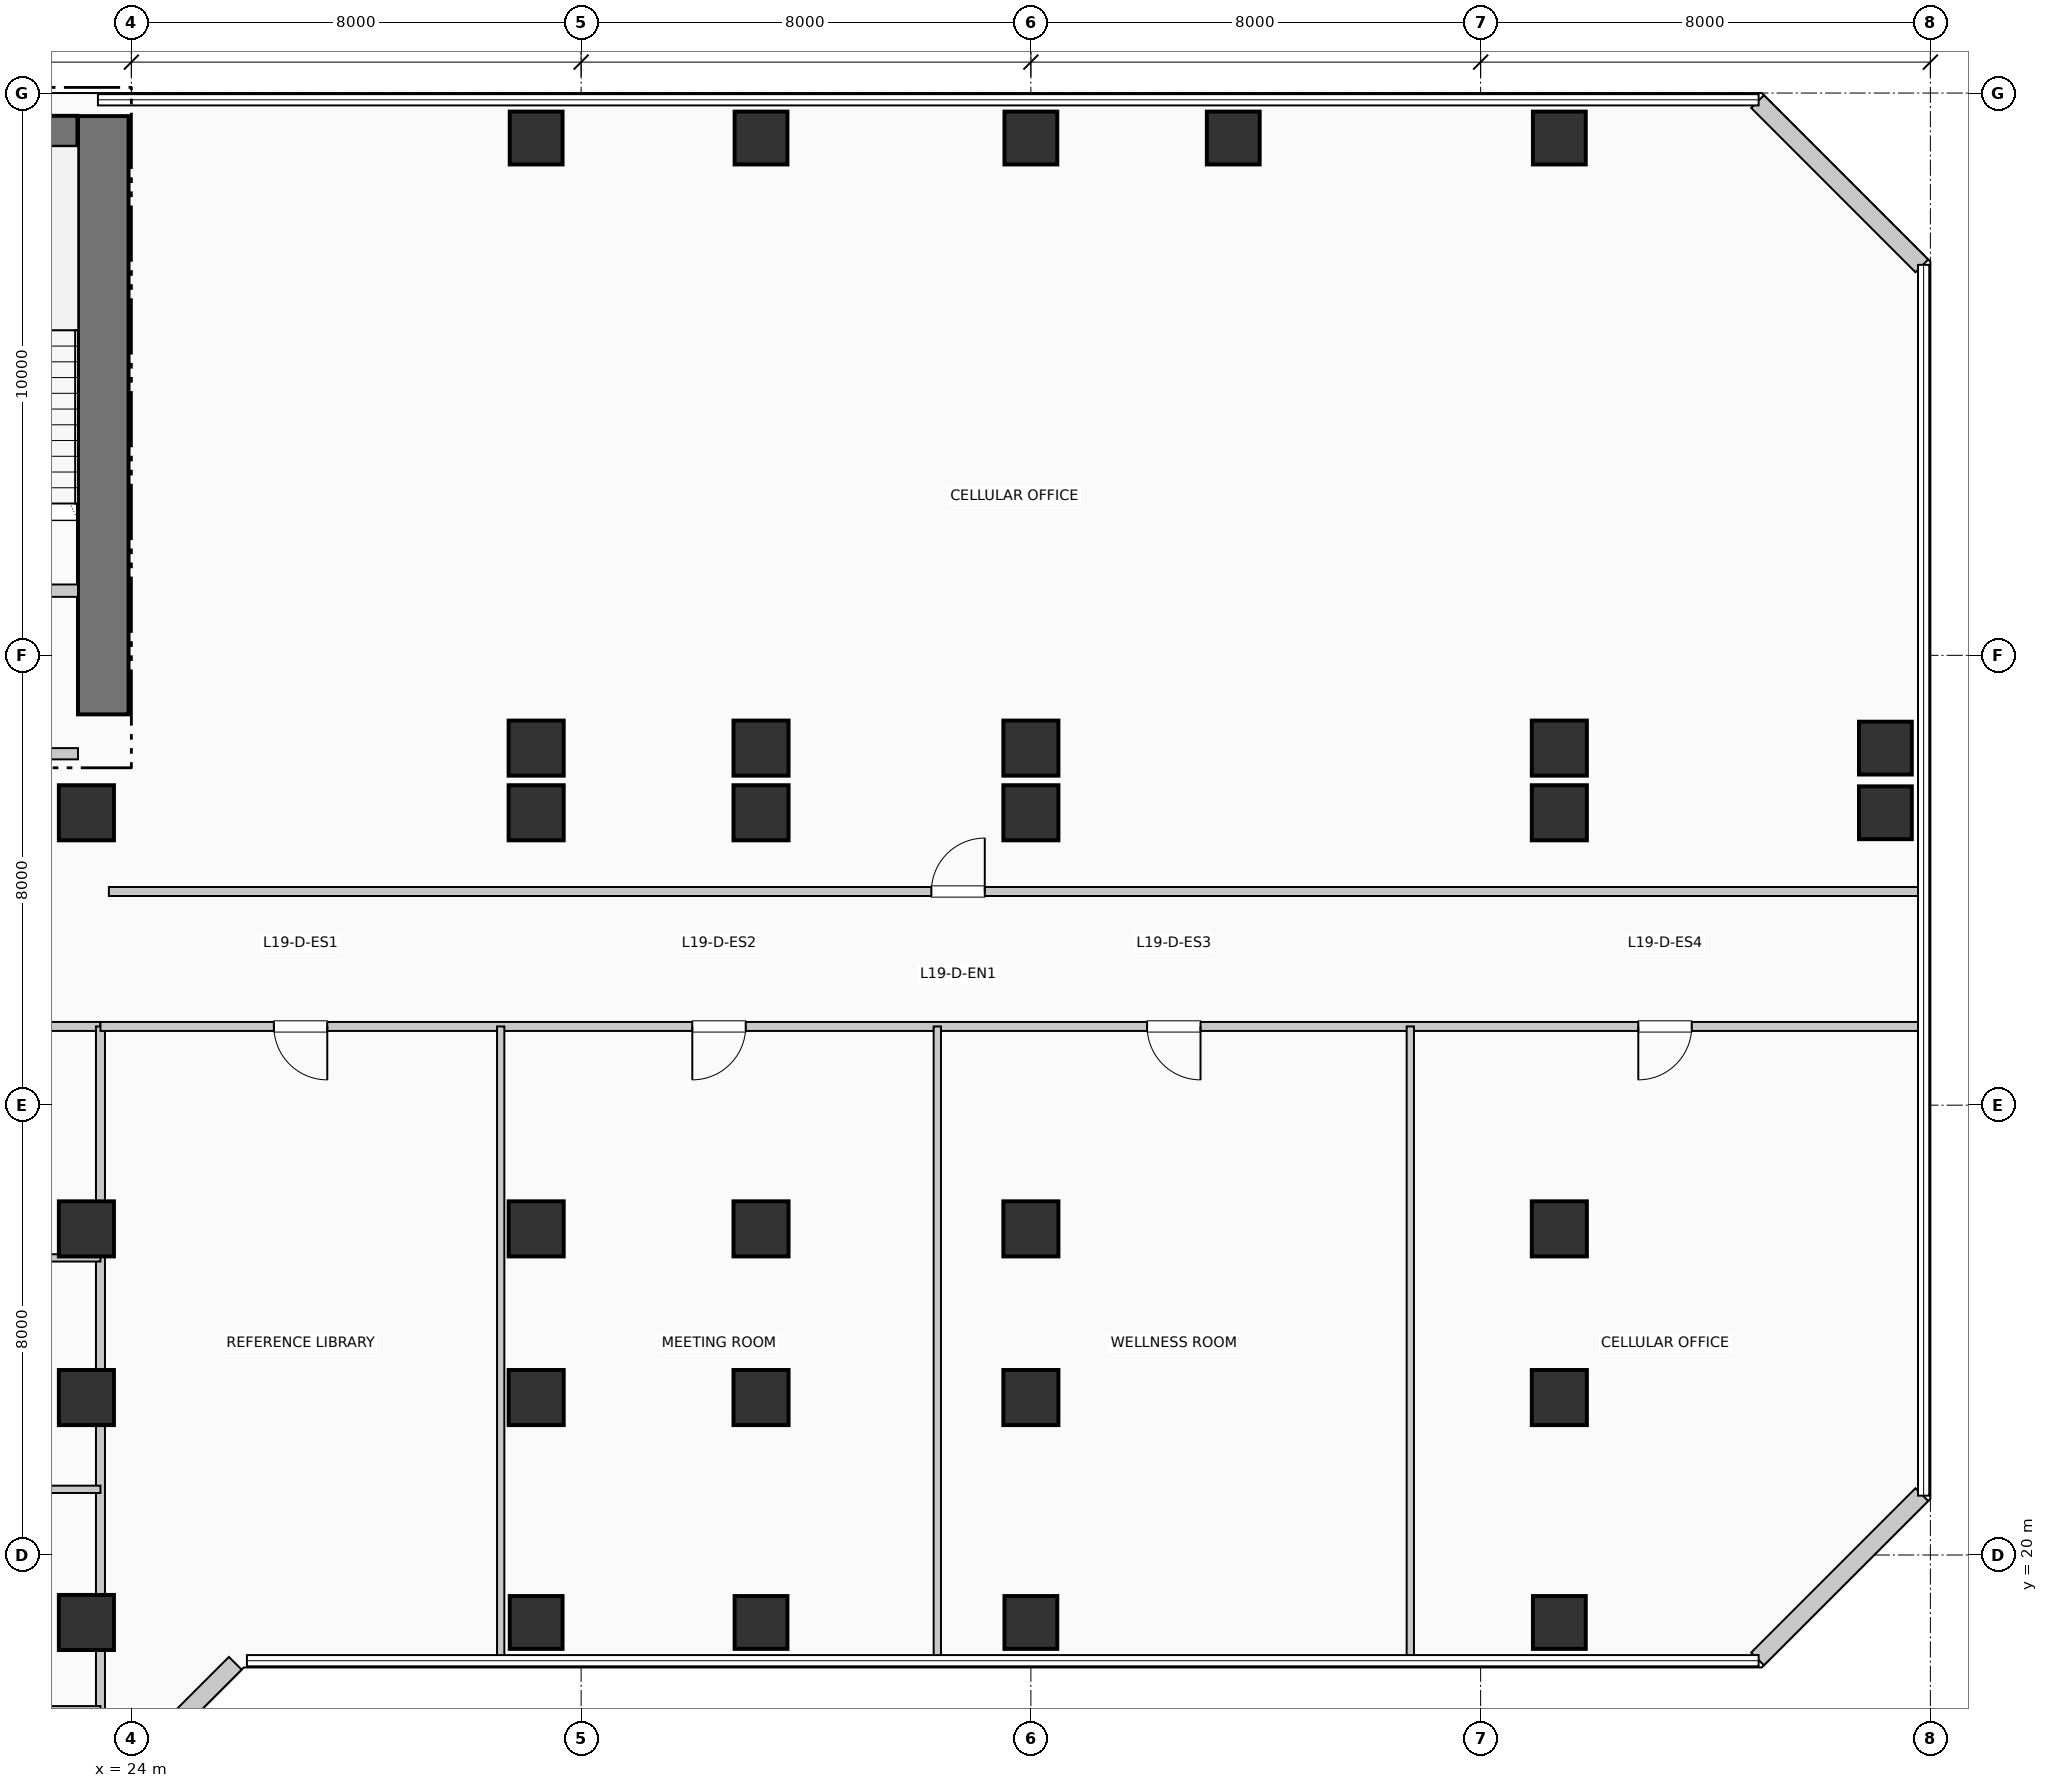
"""IFC4 building model, lengths in metres.
Left out: names, types, materials, properties, quantities, classifications, styles, units other than length and angle.
Written with IfcOpenShell. Run it as: python <this file> out.ifc"""

import sys

from ifc_helpers import new_model, si_unit, direction, frame, frame_2d, origin, origin_2d, place, context, subcontext, project, spatial, rectangle, extrude, element, fill, save


model = new_model("IFC4")
c1 = context("Model", 3, precision=1e-05, world=origin(), true_north=direction((0.0, 1.0)))
c2 = subcontext(c1, "Body", "Model", "MODEL_VIEW")
j1 = project(units=[si_unit("LENGTHUNIT", "METRE"), si_unit("PLANEANGLEUNIT", "RADIAN")], contexts=[c1])
p1 = place(None, origin())
s1 = spatial("IfcSite", under=j1, at=p1, CompositionType="ELEMENT")
p2 = place(p1, origin())
s2 = spatial("IfcBuilding", under=s1, at=p2, CompositionType="ELEMENT")
p3 = place(p2, frame((0.0, 0.0, 81.84)))
s3 = spatial("IfcBuildingStorey", under=s2, at=p3, CompositionType="ELEMENT", Elevation=81.84)
p4 = place(p3, frame((23.5, 34.95, 0.0), z_axis=(0.0, 0.0, 1.0), x_axis=(0.0, 1.0, 0.0)))
e1 = element("IfcWall", 1, at=p4, inside=s3, PredefinedType="SHEAR", context=c2, shape_type="SweptSolid", body=[
    extrude(rectangle(XDim=10.64, YDim=0.9, at=frame_2d((5.32, 0.0))), origin(), (0.0, 0.0, 1.0), 3.96),
])
p5 = place(p3, frame((19.35, 45.32, 0.0), z_axis=(0.0, 0.0, 1.0), x_axis=(1.0, 0.0, 0.0)))
e2 = element("IfcWall", 2, at=p5, inside=s3, PredefinedType="SHEAR", context=c2, shape_type="SweptSolid", body=[
    extrude(rectangle(XDim=3.69, YDim=0.55, at=frame_2d((1.845, 0.0))), origin(), (0.0, 0.0, 1.0), 3.96),
])
p6 = place(p5, frame((1.15, 0.0, 1.05)))
e3 = element("IfcOpeningElement", 3, at=p6, cuts=e2, PredefinedType="OPENING", context=c2, shape_type="SweptSolid", body=[
    extrude(rectangle(XDim=1.4, YDim=1.8, at=frame_2d((0.7, 0.9))), frame((0.0, 0.285, 0.0), z_axis=(0.0, -1.0, 0.0), x_axis=(1.0, 0.0, 0.0)), (0.0, 0.0, 1.0), 0.57),
])
for number, where, z_axis, x_axis in (
    (4, (23.2, 18.8, 0.0), (0.0, 0.0, 1.0), (1.0, 0.0, 0.0)),
    (5, (23.2, 22.8, 0.0), (0.0, 0.0, 1.0), (1.0, 0.0, 0.0)),
    (6, (23.2, 25.8, 0.0), (0.0, 0.0, 1.0), (1.0, 0.0, 0.0)),
    (7, (23.2, 33.2, 0.0), (0.0, 0.0, 1.0), (1.0, 0.0, 0.0)),
):
    element("IfcColumn", number, at=place(p3, frame(where, z_axis=z_axis, x_axis=x_axis)), inside=s3, PredefinedType="COLUMN", context=c2, shape_type="SweptSolid", body=[
        extrude(rectangle(XDim=0.98, YDim=0.98, at=origin_2d()), origin(), (0.0, 0.0, 1.0), 3.96),
    ])
p7 = place(p3, frame((31.2, 18.8, 0.0), z_axis=(0.0, 0.0, 1.0), x_axis=(1.0, 0.0, 0.0)))
e8 = element("IfcColumn", 8, at=p7, inside=s3, PredefinedType="COLUMN", context=c2, shape_type="SweptSolid", body=[
    extrude(rectangle(XDim=0.94, YDim=0.94, at=origin_2d()), origin(), (0.0, 0.0, 1.0), 3.96),
])
for number, where, z_axis, x_axis in (
    (9, (31.2, 22.8, 0.0), (0.0, 0.0, 1.0), (1.0, 0.0, 0.0)),
    (10, (31.2, 25.8, 0.0), (0.0, 0.0, 1.0), (1.0, 0.0, 0.0)),
    (11, (31.2, 33.2, 0.0), (0.0, 0.0, 1.0), (1.0, 0.0, 0.0)),
    (12, (31.2, 34.35, 0.0), (0.0, 0.0, 1.0), (1.0, 0.0, 0.0)),
):
    element("IfcColumn", number, at=place(p3, frame(where, z_axis=z_axis, x_axis=x_axis)), inside=s3, PredefinedType="COLUMN", context=c2, shape_type="SweptSolid", body=[
        extrude(rectangle(XDim=0.98, YDim=0.98, at=origin_2d()), origin(), (0.0, 0.0, 1.0), 3.96),
    ])
for number, where, z_axis, x_axis in (
    (13, (31.2, 45.2, 0.0), (0.0, 0.0, 1.0), (1.0, 0.0, 0.0)),
    (14, (35.2, 18.8, 0.0), (0.0, 0.0, 1.0), (1.0, 0.0, 0.0)),
):
    element("IfcColumn", number, at=place(p3, frame(where, z_axis=z_axis, x_axis=x_axis)), inside=s3, PredefinedType="COLUMN", context=c2, shape_type="SweptSolid", body=[
        extrude(rectangle(XDim=0.94, YDim=0.94, at=origin_2d()), origin(), (0.0, 0.0, 1.0), 3.96),
    ])
for number, where, z_axis, x_axis in (
    (15, (35.2, 22.8, 0.0), (0.0, 0.0, 1.0), (1.0, 0.0, 0.0)),
    (16, (35.2, 25.8, 0.0), (0.0, 0.0, 1.0), (1.0, 0.0, 0.0)),
    (17, (35.2, 33.2, 0.0), (0.0, 0.0, 1.0), (1.0, 0.0, 0.0)),
    (18, (35.2, 34.35, 0.0), (0.0, 0.0, 1.0), (1.0, 0.0, 0.0)),
):
    element("IfcColumn", number, at=place(p3, frame(where, z_axis=z_axis, x_axis=x_axis)), inside=s3, PredefinedType="COLUMN", context=c2, shape_type="SweptSolid", body=[
        extrude(rectangle(XDim=0.98, YDim=0.98, at=origin_2d()), origin(), (0.0, 0.0, 1.0), 3.96),
    ])
for number, where, z_axis, x_axis in (
    (19, (35.2, 45.2, 0.0), (0.0, 0.0, 1.0), (1.0, 0.0, 0.0)),
    (20, (40.0, 18.8, 0.0), (0.0, 0.0, 1.0), (1.0, 0.0, 0.0)),
):
    element("IfcColumn", number, at=place(p3, frame(where, z_axis=z_axis, x_axis=x_axis)), inside=s3, PredefinedType="COLUMN", context=c2, shape_type="SweptSolid", body=[
        extrude(rectangle(XDim=0.94, YDim=0.94, at=origin_2d()), origin(), (0.0, 0.0, 1.0), 3.96),
    ])
for number, where, z_axis, x_axis in (
    (21, (40.0, 22.8, 0.0), (0.0, 0.0, 1.0), (1.0, 0.0, 0.0)),
    (22, (40.0, 25.8, 0.0), (0.0, 0.0, 1.0), (1.0, 0.0, 0.0)),
    (23, (40.0, 33.2, 0.0), (0.0, 0.0, 1.0), (1.0, 0.0, 0.0)),
    (24, (40.0, 34.35, 0.0), (0.0, 0.0, 1.0), (1.0, 0.0, 0.0)),
):
    element("IfcColumn", number, at=place(p3, frame(where, z_axis=z_axis, x_axis=x_axis)), inside=s3, PredefinedType="COLUMN", context=c2, shape_type="SweptSolid", body=[
        extrude(rectangle(XDim=0.98, YDim=0.98, at=origin_2d()), origin(), (0.0, 0.0, 1.0), 3.96),
    ])
for number, where, z_axis, x_axis in (
    (25, (40.0, 45.2, 0.0), (0.0, 0.0, 1.0), (1.0, 0.0, 0.0)),
    (26, (43.6, 45.2, 0.0), (0.0, 0.0, 1.0), (1.0, 0.0, 0.0)),
    (27, (49.4, 18.8, 0.0), (0.0, 0.0, 1.0), (1.0, 0.0, 0.0)),
):
    element("IfcColumn", number, at=place(p3, frame(where, z_axis=z_axis, x_axis=x_axis)), inside=s3, PredefinedType="COLUMN", context=c2, shape_type="SweptSolid", body=[
        extrude(rectangle(XDim=0.94, YDim=0.94, at=origin_2d()), origin(), (0.0, 0.0, 1.0), 3.96),
    ])
for number, where, z_axis, x_axis in (
    (28, (49.4, 22.8, 0.0), (0.0, 0.0, 1.0), (1.0, 0.0, 0.0)),
    (29, (49.4, 25.8, 0.0), (0.0, 0.0, 1.0), (1.0, 0.0, 0.0)),
    (30, (49.4, 33.2, 0.0), (0.0, 0.0, 1.0), (1.0, 0.0, 0.0)),
    (31, (49.4, 34.35, 0.0), (0.0, 0.0, 1.0), (1.0, 0.0, 0.0)),
):
    element("IfcColumn", number, at=place(p3, frame(where, z_axis=z_axis, x_axis=x_axis)), inside=s3, PredefinedType="COLUMN", context=c2, shape_type="SweptSolid", body=[
        extrude(rectangle(XDim=0.98, YDim=0.98, at=origin_2d()), origin(), (0.0, 0.0, 1.0), 3.96),
    ])
for number, where, z_axis, x_axis in (
    (32, (49.4, 45.2, 0.0), (0.0, 0.0, 1.0), (1.0, 0.0, 0.0)),
    (33, (55.2, 33.2, 0.0), (0.0, 0.0, 1.0), (1.0, 0.0, 0.0)),
    (34, (55.2, 34.35, 0.0), (0.0, 0.0, 1.0), (1.0, 0.0, 0.0)),
):
    element("IfcColumn", number, at=place(p3, frame(where, z_axis=z_axis, x_axis=x_axis)), inside=s3, PredefinedType="COLUMN", context=c2, shape_type="SweptSolid", body=[
        extrude(rectangle(XDim=0.94, YDim=0.94, at=origin_2d()), origin(), (0.0, 0.0, 1.0), 3.96),
    ])
p8 = place(p3, frame((23.926, 16.152, 0.0), z_axis=(0.0, 0.0, 1.0), x_axis=(0.707106781187, 0.707106781187, 0.0)))
e35 = element("IfcWall", 35, at=p8, inside=s3, PredefinedType="SOLIDWALL", context=c2, shape_type="SweptSolid", body=[
    extrude(rectangle(XDim=2.718, YDim=0.32, at=frame_2d((1.359, 0.0))), origin(), (0.0, 0.0, 1.0), 3.71),
])
for number, where, z_axis, x_axis in (
    (36, (52.926, 18.152, 0.0), (0.0, 0.0, 1.0), (0.707, 0.707, 0.0)),
    (37, (55.848, 42.926, 0.0), (0.0, 0.0, 1.0), (-0.707, 0.707, 0.0)),
):
    element("IfcWall", number, at=place(p3, frame(where, z_axis=z_axis, x_axis=x_axis)), inside=s3, PredefinedType="SOLIDWALL", context=c2, shape_type="SweptSolid", body=[
        extrude(rectangle(XDim=4.133, YDim=0.32, at=frame_2d((2.066, 0.0))), origin(), (0.0, 0.0, 1.0), 3.71),
    ])
p9 = place(p3, frame((19.9, 37.15, 0.0), z_axis=(0.0, 0.0, 1.0), x_axis=(1.0, 0.0, 0.0)))
e38 = element("IfcWall", 38, at=p9, inside=s3, PredefinedType="PARTITIONING", context=c2, shape_type="SweptSolid", body=[
    extrude(rectangle(XDim=3.15, YDim=0.22, at=frame_2d((1.575, 0.0))), origin(), (0.0, 0.0, 1.0), 3.71),
])
p10 = place(p9, frame((2.05, 0.0, 0.0), z_axis=(0.0, 0.0, 1.0), x_axis=(-1.0, 0.0, 0.0)))
e39 = element("IfcOpeningElement", 39, at=p10, cuts=e38, PredefinedType="OPENING", context=c2, shape_type="SweptSolid", body=[
    extrude(rectangle(XDim=1.05, YDim=2.15, at=frame_2d((0.525, 1.075))), frame((0.0, 0.12, 0.0), z_axis=(0.0, -1.0, 0.0), x_axis=(1.0, 0.0, 0.0)), (0.0, 0.0, 1.0), 0.24),
])
p11 = place(p3, frame((19.8, 34.25, 0.0), z_axis=(0.0, 0.0, 1.0), x_axis=(1.0, 0.0, 0.0)))
e40 = element("IfcWall", 40, at=p11, inside=s3, PredefinedType="PARTITIONING", context=c2, shape_type="SweptSolid", body=[
    extrude(rectangle(XDim=3.25, YDim=0.2, at=frame_2d((1.625, 0.0))), origin(), (0.0, 0.0, 1.0), 3.71),
])
p12 = place(p11, frame((2.15, 0.0, 0.0), z_axis=(0.0, 0.0, 1.0), x_axis=(-1.0, 0.0, 0.0)))
e41 = element("IfcOpeningElement", 41, at=p12, cuts=e40, PredefinedType="OPENING", context=c2, shape_type="SweptSolid", body=[
    extrude(rectangle(XDim=1.1, YDim=2.15, at=frame_2d((0.55, 1.075))), frame((0.0, 0.11, 0.0), z_axis=(0.0, -1.0, 0.0), x_axis=(1.0, 0.0, 0.0)), (0.0, 0.0, 1.0), 0.22),
])
p13 = place(p3, frame((6.4, 29.4, 0.0), z_axis=(0.0, 0.0, 1.0), x_axis=(1.0, 0.0, 0.0)))
e42 = element("IfcWall", 42, at=p13, inside=s3, PredefinedType="PARTITIONING", context=c2, shape_type="SweptSolid", body=[
    extrude(rectangle(XDim=17.05, YDim=0.16, at=frame_2d((8.525, 0.0))), origin(), (0.0, 0.0, 1.0), 3.365),
])
p14 = place(p3, frame((23.45, 0.19, 0.0), z_axis=(0.0, 0.0, 1.0), x_axis=(0.0, 1.0, 0.0)))
e43 = element("IfcWall", 43, at=p14, inside=s3, PredefinedType="PARTITIONING", context=c2, shape_type="SweptSolid", body=[
    extrude(rectangle(XDim=29.21, YDim=0.16, at=frame_2d((14.605, 0.0))), origin(), (0.0, 0.0, 1.0), 2.995),
])
for number, where, z_axis, x_axis in (
    (44, (6.4, 17.248, 0.0), (0.0, 0.0, 1.0), (1.0, 0.0, 0.0)),
    (45, (6.4, 21.168, 0.0), (0.0, 0.0, 1.0), (1.0, 0.0, 0.0)),
    (46, (6.4, 25.284, 0.0), (0.0, 0.0, 1.0), (1.0, 0.0, 0.0)),
):
    element("IfcWall", number, at=place(p3, frame(where, z_axis=z_axis, x_axis=x_axis)), inside=s3, PredefinedType="PARTITIONING", context=c2, shape_type="SweptSolid", body=[
        extrude(rectangle(XDim=17.05, YDim=0.13, at=frame_2d((8.525, 0.0))), origin(), (0.0, 0.0, 1.0), 3.71),
    ])
p15 = place(p3, frame((23.45, 29.4, 0.0), z_axis=(0.0, 0.0, 1.0), x_axis=(1.0, 0.0, 0.0)))
e47 = element("IfcWall", 47, at=p15, inside=s3, PredefinedType="PARTITIONING", context=c2, shape_type="SweptSolid", body=[
    extrude(rectangle(XDim=32.36, YDim=0.16, at=frame_2d((16.18, 0.0))), origin(), (0.0, 0.0, 1.0), 3.365),
])
p16 = place(p15, frame((4.035, 0.0, 0.0), z_axis=(0.0, 0.0, 1.0), x_axis=(-1.0, 0.0, 0.0)))
e48 = element("IfcOpeningElement", 48, at=p16, cuts=e47, PredefinedType="OPENING", context=c2, shape_type="SweptSolid", body=[
    extrude(rectangle(XDim=0.95, YDim=2.15, at=frame_2d((0.475, 1.075))), frame((0.0, 0.09, 0.0), z_axis=(0.0, -1.0, 0.0), x_axis=(1.0, 0.0, 0.0)), (0.0, 0.0, 1.0), 0.18),
])
p17 = place(p15, frame((11.477, 0.0, 0.0), z_axis=(0.0, 0.0, 1.0), x_axis=(-1.0, 0.0, 0.0)))
e49 = element("IfcOpeningElement", 49, at=p17, cuts=e47, PredefinedType="OPENING", context=c2, shape_type="SweptSolid", body=[
    extrude(rectangle(XDim=0.95, YDim=2.15, at=frame_2d((0.475, 1.075))), frame((0.0, 0.09, 0.0), z_axis=(0.0, -1.0, 0.0), x_axis=(1.0, 0.0, 0.0)), (0.0, 0.0, 1.0), 0.18),
])
p18 = place(p15, frame((19.567, 0.0, 0.0), z_axis=(0.0, 0.0, 1.0), x_axis=(-1.0, 0.0, 0.0)))
e50 = element("IfcOpeningElement", 50, at=p18, cuts=e47, PredefinedType="OPENING", context=c2, shape_type="SweptSolid", body=[
    extrude(rectangle(XDim=0.95, YDim=2.15, at=frame_2d((0.475, 1.075))), frame((0.0, 0.09, 0.0), z_axis=(0.0, -1.0, 0.0), x_axis=(1.0, 0.0, 0.0)), (0.0, 0.0, 1.0), 0.18),
])
p19 = place(p15, frame((28.304, 0.0, 0.0), z_axis=(0.0, 0.0, 1.0), x_axis=(-1.0, 0.0, 0.0)))
e51 = element("IfcOpeningElement", 51, at=p19, cuts=e47, PredefinedType="OPENING", context=c2, shape_type="SweptSolid", body=[
    extrude(rectangle(XDim=0.95, YDim=2.15, at=frame_2d((0.475, 1.075))), frame((0.0, 0.09, 0.0), z_axis=(0.0, -1.0, 0.0), x_axis=(1.0, 0.0, 0.0)), (0.0, 0.0, 1.0), 0.18),
])
p20 = place(p3, frame((23.6, 31.8, 0.0), z_axis=(0.0, 0.0, 1.0), x_axis=(1.0, 0.0, 0.0)))
e52 = element("IfcWall", 52, at=p20, inside=s3, PredefinedType="PARTITIONING", context=c2, shape_type="SweptSolid", body=[
    extrude(rectangle(XDim=32.21, YDim=0.16, at=frame_2d((16.105, 0.0))), origin(), (0.0, 0.0, 1.0), 3.71),
])
p21 = place(p20, frame((14.63, 0.0, 0.0)))
e53 = element("IfcOpeningElement", 53, at=p21, cuts=e52, PredefinedType="OPENING", context=c2, shape_type="SweptSolid", body=[
    extrude(rectangle(XDim=0.95, YDim=2.15, at=frame_2d((0.475, 1.075))), frame((0.0, 0.09, 0.0), z_axis=(0.0, -1.0, 0.0), x_axis=(1.0, 0.0, 0.0)), (0.0, 0.0, 1.0), 0.18),
])
for number, where, z_axis, x_axis in (
    (54, (30.569, 18.19, 0.0), (0.0, 0.0, 1.0), (0.0, 1.0, 0.0)),
    (55, (38.336, 18.19, 0.0), (0.0, 0.0, 1.0), (0.0, 1.0, 0.0)),
    (56, (46.749, 18.19, 0.0), (0.0, 0.0, 1.0), (0.0, 1.0, 0.0)),
):
    element("IfcWall", number, at=place(p3, frame(where, z_axis=z_axis, x_axis=x_axis)), inside=s3, PredefinedType="PARTITIONING", context=c2, shape_type="SweptSolid", body=[
        extrude(rectangle(XDim=11.21, YDim=0.13, at=frame_2d((5.605, 0.0))), origin(), (0.0, 0.0, 1.0), 3.71),
    ])
p22 = place(p16, origin())
e57 = element("IfcDoor", 57, at=p22, inside=s3, OperationType="SINGLE_SWING_RIGHT", PredefinedType="DOOR", context=c2, shape_type="SweptSolid", body=[
    extrude(rectangle(XDim=0.95, YDim=2.15, at=frame_2d((0.475, 1.075))), frame((0.0, 0.025, 0.0), z_axis=(0.0, -1.0, 0.0), x_axis=(1.0, 0.0, 0.0)), (0.0, 0.0, 1.0), 0.05),
])
fill(e48, e57)
p23 = place(p17, origin())
e58 = element("IfcDoor", 58, at=p23, inside=s3, OperationType="SINGLE_SWING_LEFT", PredefinedType="DOOR", context=c2, shape_type="SweptSolid", body=[
    extrude(rectangle(XDim=0.95, YDim=2.15, at=frame_2d((0.475, 1.075))), frame((0.0, 0.025, 0.0), z_axis=(0.0, -1.0, 0.0), x_axis=(1.0, 0.0, 0.0)), (0.0, 0.0, 1.0), 0.05),
])
fill(e49, e58)
p24 = place(p18, origin())
e59 = element("IfcDoor", 59, at=p24, inside=s3, OperationType="SINGLE_SWING_RIGHT", PredefinedType="DOOR", context=c2, shape_type="SweptSolid", body=[
    extrude(rectangle(XDim=0.95, YDim=2.15, at=frame_2d((0.475, 1.075))), frame((0.0, 0.025, 0.0), z_axis=(0.0, -1.0, 0.0), x_axis=(1.0, 0.0, 0.0)), (0.0, 0.0, 1.0), 0.05),
])
fill(e50, e59)
p25 = place(p19, origin())
e60 = element("IfcDoor", 60, at=p25, inside=s3, OperationType="SINGLE_SWING_LEFT", PredefinedType="DOOR", context=c2, shape_type="SweptSolid", body=[
    extrude(rectangle(XDim=0.95, YDim=2.15, at=frame_2d((0.475, 1.075))), frame((0.0, 0.025, 0.0), z_axis=(0.0, -1.0, 0.0), x_axis=(1.0, 0.0, 0.0)), (0.0, 0.0, 1.0), 0.05),
])
fill(e51, e60)
p26 = place(p21, origin())
e61 = element("IfcDoor", 61, at=p26, inside=s3, OperationType="SINGLE_SWING_RIGHT", PredefinedType="DOOR", context=c2, shape_type="SweptSolid", body=[
    extrude(rectangle(XDim=0.95, YDim=2.15, at=frame_2d((0.475, 1.075))), frame((0.0, 0.025, 0.0), z_axis=(0.0, -1.0, 0.0), x_axis=(1.0, 0.0, 0.0)), (0.0, 0.0, 1.0), 0.05),
])
fill(e53, e61)
save(model, sys.argv[1])
